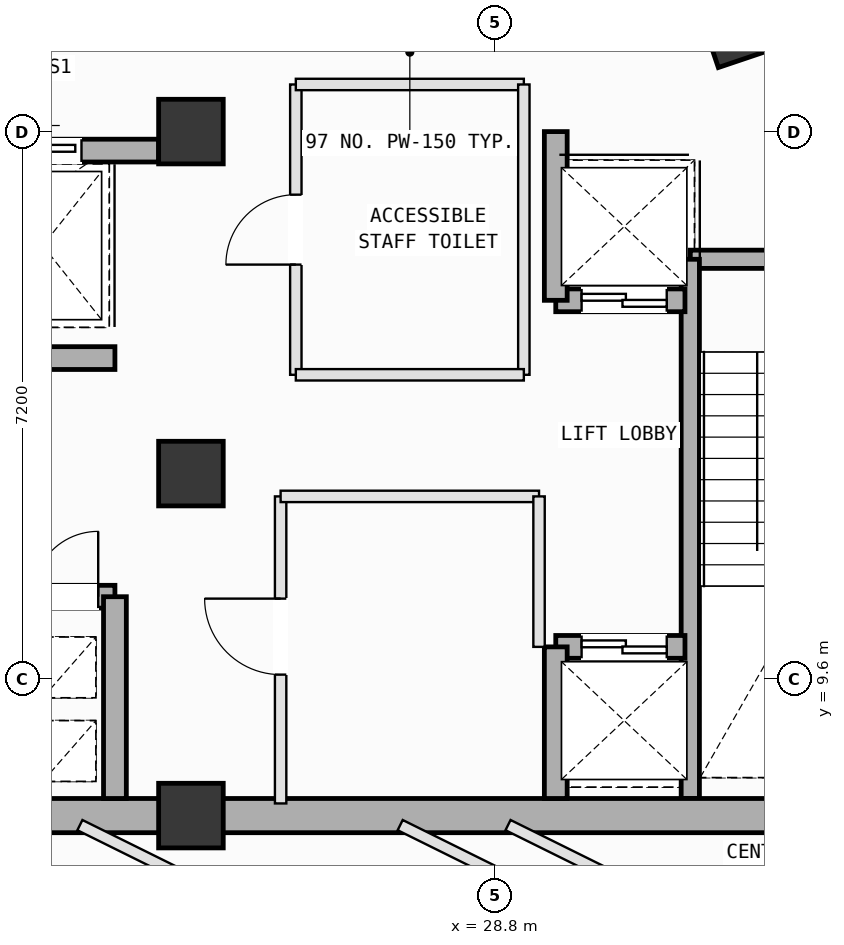
"""IFC4 building model, lengths in metres.
Left out: names, types, materials, properties, quantities, classifications, styles, units other than length and angle.
Written with IfcOpenShell. Run it as: python <this file> out.ifc"""

import sys

from ifc_helpers import new_model, si_unit, direction, frame, frame_2d, origin, origin_2d, place, context, subcontext, project, spatial, rectangle, extrude, element, fill, save


model = new_model("IFC4")
c1 = context("Model", 3, precision=1e-05, world=origin(), true_north=direction((0.0, 1.0)))
c2 = subcontext(c1, "Body", "Model", "MODEL_VIEW")
j1 = project(units=[si_unit("LENGTHUNIT", "METRE"), si_unit("PLANEANGLEUNIT", "RADIAN")], contexts=[c1])
p1 = place(None, origin())
s1 = spatial("IfcSite", under=j1, at=p1, CompositionType="ELEMENT")
p2 = place(p1, origin())
s2 = spatial("IfcBuilding", under=s1, at=p2, CompositionType="ELEMENT")
p3 = place(p2, frame((0.0, 0.0, 296.6)))
s3 = spatial("IfcBuildingStorey", under=s2, at=p3, CompositionType="ELEMENT", Elevation=296.6)
for number, where, z_axis, x_axis in (
    (1, (24.8, 7.8, 0.0), (0.0, 0.0, 1.0), (1.0, 0.0, 0.0)),
    (2, (24.8, 12.3, 0.0), (0.0, 0.0, 1.0), (1.0, 0.0, 0.0)),
    (3, (24.8, 16.8, 0.0), (0.0, 0.0, 1.0), (1.0, 0.0, 0.0)),
):
    element("IfcColumn", number, at=place(p3, frame(where, z_axis=z_axis, x_axis=x_axis)), inside=s3, PredefinedType="COLUMN", context=c2, shape_type="SweptSolid", body=[
        extrude(rectangle(XDim=0.85, YDim=0.85, at=origin_2d()), origin(), (0.0, 0.0, 1.0), 4.0),
    ])
p4 = place(p3, frame((31.37, 15.12, 0.0), z_axis=(0.0, 0.0, 1.0), x_axis=(1.0, 0.0, 0.0)))
e4 = element("IfcWall", 4, at=p4, inside=s3, PredefinedType="SOLIDWALL", context=c2, shape_type="SweptSolid", body=[
    extrude(rectangle(XDim=3.46, YDim=0.24, at=frame_2d((1.73, 0.0))), origin(), (0.0, 0.0, 1.0), 3.78),
])
p5 = place(p4, frame((2.14, 0.0, 0.0)))
e5 = element("IfcOpeningElement", 5, at=p5, cuts=e4, PredefinedType="OPENING", context=c2, shape_type="SweptSolid", body=[
    extrude(rectangle(XDim=1.1, YDim=2.15, at=frame_2d((0.55, 1.075))), frame((0.0, 0.13, 0.0), z_axis=(0.0, -1.0, 0.0), x_axis=(1.0, 0.0, 0.0)), (0.0, 0.0, 1.0), 0.26),
])
p6 = place(p3, frame((31.37, 8.025, 0.0), z_axis=(0.0, 0.0, 1.0), x_axis=(0.0, 1.0, 0.0)))
e6 = element("IfcWall", 6, at=p6, inside=s3, PredefinedType="SOLIDWALL", context=c2, shape_type="SweptSolid", body=[
    extrude(rectangle(XDim=7.095, YDim=0.24, at=frame_2d((3.548, 0.0))), origin(), (0.0, 0.0, 1.0), 3.78),
])
for number, where, z_axis, x_axis in (
    (7, (14.0, 7.8, 0.0), (0.0, 0.0, 1.0), (1.0, 0.0, 0.0)),
    (8, (24.8, 7.8, 0.0), (0.0, 0.0, 1.0), (1.0, 0.0, 0.0)),
):
    element("IfcWall", number, at=place(p3, frame(where, z_axis=z_axis, x_axis=x_axis)), inside=s3, PredefinedType="SHEAR", context=c2, shape_type="SweptSolid", body=[
        extrude(rectangle(XDim=10.8, YDim=0.45, at=frame_2d((5.4, 0.0))), origin(), (0.0, 0.0, 1.0), 3.78),
    ])
p7 = place(p3, frame((19.85, 16.55, 0.0), z_axis=(0.0, 0.0, 1.0), x_axis=(1.0, 0.0, 0.0)))
e9 = element("IfcWall", 9, at=p7, inside=s3, PredefinedType="SOLIDWALL", context=c2, shape_type="SweptSolid", body=[
    extrude(rectangle(XDim=4.525, YDim=0.3, at=frame_2d((2.262, 0.0))), origin(), (0.0, 0.0, 1.0), 3.78),
])
p8 = place(p7, frame((0.475, 0.0, 0.0)))
e10 = element("IfcOpeningElement", 10, at=p8, cuts=e9, PredefinedType="OPENING", context=c2, shape_type="SweptSolid", body=[
    extrude(rectangle(XDim=1.25, YDim=2.18, at=frame_2d((0.625, 1.09))), frame((0.0, 0.16, 0.0), z_axis=(0.0, -1.0, 0.0), x_axis=(1.0, 0.0, 0.0)), (0.0, 0.0, 1.0), 0.32),
])
p9 = place(p7, frame((2.49, 0.0, 0.0)))
e11 = element("IfcOpeningElement", 11, at=p9, cuts=e9, PredefinedType="OPENING", context=c2, shape_type="SweptSolid", body=[
    extrude(rectangle(XDim=1.02, YDim=2.12, at=frame_2d((0.51, 1.06))), frame((0.0, 0.16, 0.0), z_axis=(0.0, -1.0, 0.0), x_axis=(1.0, 0.0, 0.0)), (0.0, 0.0, 1.0), 0.32),
])
p10 = place(p3, frame((18.5, 10.68, 0.0), z_axis=(0.0, 0.0, 1.0), x_axis=(1.0, 0.0, 0.0)))
e12 = element("IfcWall", 12, at=p10, inside=s3, PredefinedType="SOLIDWALL", context=c2, shape_type="SweptSolid", body=[
    extrude(rectangle(XDim=5.3, YDim=0.3, at=frame_2d((2.65, 0.0))), origin(), (0.0, 0.0, 1.0), 3.78),
])
p11 = place(p10, frame((4.22, 0.0, 0.0)))
e13 = element("IfcOpeningElement", 13, at=p11, cuts=e12, PredefinedType="OPENING", context=c2, shape_type="SweptSolid", body=[
    extrude(rectangle(XDim=0.86, YDim=2.06, at=frame_2d((0.43, 1.03))), frame((0.0, 0.16, 0.0), z_axis=(0.0, -1.0, 0.0), x_axis=(1.0, 0.0, 0.0)), (0.0, 0.0, 1.0), 0.32),
])
p12 = place(p10, frame((0.425, 0.0, 0.0)))
e14 = element("IfcOpeningElement", 14, at=p12, cuts=e12, PredefinedType="OPENING", context=c2, shape_type="SweptSolid", body=[
    extrude(rectangle(XDim=1.25, YDim=2.18, at=frame_2d((0.625, 1.09))), frame((0.0, 0.16, 0.0), z_axis=(0.0, -1.0, 0.0), x_axis=(1.0, 0.0, 0.0)), (0.0, 0.0, 1.0), 0.32),
])
p13 = place(p10, frame((2.525, 0.0, 0.0)))
e15 = element("IfcOpeningElement", 15, at=p13, cuts=e12, PredefinedType="OPENING", context=c2, shape_type="SweptSolid", body=[
    extrude(rectangle(XDim=1.25, YDim=2.18, at=frame_2d((0.625, 1.09))), frame((0.0, 0.16, 0.0), z_axis=(0.0, -1.0, 0.0), x_axis=(1.0, 0.0, 0.0)), (0.0, 0.0, 1.0), 0.32),
])
p14 = place(p3, frame((18.5, 13.82, 0.0), z_axis=(0.0, 0.0, 1.0), x_axis=(1.0, 0.0, 0.0)))
e16 = element("IfcWall", 16, at=p14, inside=s3, PredefinedType="SOLIDWALL", context=c2, shape_type="SweptSolid", body=[
    extrude(rectangle(XDim=5.3, YDim=0.3, at=frame_2d((2.65, 0.0))), origin(), (0.0, 0.0, 1.0), 3.78),
])
p15 = place(p14, frame((0.18, 0.0, 0.0)))
e17 = element("IfcOpeningElement", 17, at=p15, cuts=e16, PredefinedType="OPENING", context=c2, shape_type="SweptSolid", body=[
    extrude(rectangle(XDim=1.1, YDim=2.15, at=frame_2d((0.55, 1.075))), frame((0.0, 0.16, 0.0), z_axis=(0.0, -1.0, 0.0), x_axis=(1.0, 0.0, 0.0)), (0.0, 0.0, 1.0), 0.32),
])
p16 = place(p3, frame((23.8, 8.025, 0.0), z_axis=(0.0, 0.0, 1.0), x_axis=(0.0, 1.0, 0.0)))
e18 = element("IfcWall", 18, at=p16, inside=s3, PredefinedType="SOLIDWALL", context=c2, shape_type="SweptSolid", body=[
    extrude(rectangle(XDim=2.655, YDim=0.3, at=frame_2d((1.328, 0.0))), origin(), (0.0, 0.0, 1.0), 3.78),
])
p17 = place(p3, frame((29.6, 10.02, 0.0), z_axis=(0.0, 0.0, 1.0), x_axis=(1.0, 0.0, 0.0)))
e19 = element("IfcWall", 19, at=p17, inside=s3, PredefinedType="SOLIDWALL", context=c2, shape_type="SweptSolid", body=[
    extrude(rectangle(XDim=1.7, YDim=0.3, at=frame_2d((0.85, 0.0))), origin(), (0.0, 0.0, 1.0), 3.78),
])
p18 = place(p17, frame((0.34, 0.0, 0.0)))
e20 = element("IfcOpeningElement", 20, at=p18, cuts=e19, PredefinedType="OPENING", context=c2, shape_type="SweptSolid", body=[
    extrude(rectangle(XDim=1.12, YDim=2.15, at=frame_2d((0.56, 1.075))), frame((0.0, 0.16, 0.0), z_axis=(0.0, -1.0, 0.0), x_axis=(1.0, 0.0, 0.0)), (0.0, 0.0, 1.0), 0.32),
])
p19 = place(p3, frame((29.6, 8.025, 0.0), z_axis=(0.0, 0.0, 1.0), x_axis=(0.0, 1.0, 0.0)))
e21 = element("IfcWall", 21, at=p19, inside=s3, PredefinedType="SOLIDWALL", context=c2, shape_type="SweptSolid", body=[
    extrude(rectangle(XDim=1.995, YDim=0.3, at=frame_2d((0.998, 0.0))), origin(), (0.0, 0.0, 1.0), 3.78),
])
p20 = place(p3, frame((29.6, 14.58, 0.0), z_axis=(0.0, 0.0, 1.0), x_axis=(1.0, 0.0, 0.0)))
e22 = element("IfcWall", 22, at=p20, inside=s3, PredefinedType="SOLIDWALL", context=c2, shape_type="SweptSolid", body=[
    extrude(rectangle(XDim=1.7, YDim=0.3, at=frame_2d((0.85, 0.0))), origin(), (0.0, 0.0, 1.0), 3.78),
])
p21 = place(p20, frame((0.34, 0.0, 0.0)))
e23 = element("IfcOpeningElement", 23, at=p21, cuts=e22, PredefinedType="OPENING", context=c2, shape_type="SweptSolid", body=[
    extrude(rectangle(XDim=1.12, YDim=2.15, at=frame_2d((0.56, 1.075))), frame((0.0, 0.16, 0.0), z_axis=(0.0, -1.0, 0.0), x_axis=(1.0, 0.0, 0.0)), (0.0, 0.0, 1.0), 0.32),
])
p22 = place(p3, frame((29.6, 14.58, 0.0), z_axis=(0.0, 0.0, 1.0), x_axis=(0.0, 1.0, 0.0)))
e24 = element("IfcWall", 24, at=p22, inside=s3, PredefinedType="SOLIDWALL", context=c2, shape_type="SweptSolid", body=[
    extrude(rectangle(XDim=2.22, YDim=0.3, at=frame_2d((1.11, 0.0))), origin(), (0.0, 0.0, 1.0), 3.78),
])
p23 = place(p3, frame((25.98, 7.96, 0.0), z_axis=(0.0, 0.0, 1.0), x_axis=(0.0, 1.0, 0.0)))
e25 = element("IfcWall", 25, at=p23, inside=s3, PredefinedType="PARTITIONING", context=c2, shape_type="SweptSolid", body=[
    extrude(rectangle(XDim=4.04, YDim=0.15, at=frame_2d((2.02, 0.0))), origin(), (0.0, 0.0, 1.0), 3.78),
])
p24 = place(p23, frame((1.695, 0.0, 0.0)))
e26 = element("IfcOpeningElement", 26, at=p24, cuts=e25, PredefinedType="OPENING", context=c2, shape_type="SweptSolid", body=[
    extrude(rectangle(XDim=1.0, YDim=2.12, at=frame_2d((0.5, 1.06))), frame((0.0, 0.085, 0.0), z_axis=(0.0, -1.0, 0.0), x_axis=(1.0, 0.0, 0.0)), (0.0, 0.0, 1.0), 0.17),
])
p25 = place(p3, frame((25.98, 12.0, 0.0), z_axis=(0.0, 0.0, 1.0), x_axis=(1.0, 0.0, 0.0)))
e27 = element("IfcWall", 27, at=p25, inside=s3, PredefinedType="PARTITIONING", context=c2, shape_type="SweptSolid", body=[
    extrude(rectangle(XDim=3.4, YDim=0.15, at=frame_2d((1.7, 0.0))), origin(), (0.0, 0.0, 1.0), 3.78),
])
p26 = place(p3, frame((29.38, 12.0, 0.0), z_axis=(0.0, 0.0, 1.0), x_axis=(0.0, -1.0, 0.0)))
e28 = element("IfcWall", 28, at=p26, inside=s3, PredefinedType="PARTITIONING", context=c2, shape_type="SweptSolid", body=[
    extrude(rectangle(XDim=1.98, YDim=0.15, at=frame_2d((0.99, 0.0))), origin(), (0.0, 0.0, 1.0), 3.78),
])
p27 = place(p3, frame((26.18, 13.6, 0.0), z_axis=(0.0, 0.0, 1.0), x_axis=(0.0, 1.0, 0.0)))
e29 = element("IfcWall", 29, at=p27, inside=s3, PredefinedType="PARTITIONING", context=c2, shape_type="SweptSolid", body=[
    extrude(rectangle(XDim=3.82, YDim=0.15, at=frame_2d((1.91, 0.0))), origin(), (0.0, 0.0, 1.0), 3.78),
])
p28 = place(p27, frame((1.45, 0.0, 0.0)))
e30 = element("IfcOpeningElement", 30, at=p28, cuts=e29, PredefinedType="OPENING", context=c2, shape_type="SweptSolid", body=[
    extrude(rectangle(XDim=0.92, YDim=2.1, at=frame_2d((0.46, 1.05))), frame((0.0, 0.085, 0.0), z_axis=(0.0, -1.0, 0.0), x_axis=(1.0, 0.0, 0.0)), (0.0, 0.0, 1.0), 0.17),
])
p29 = place(p3, frame((26.18, 17.42, 0.0), z_axis=(0.0, 0.0, 1.0), x_axis=(1.0, 0.0, 0.0)))
e31 = element("IfcWall", 31, at=p29, inside=s3, PredefinedType="PARTITIONING", context=c2, shape_type="SweptSolid", body=[
    extrude(rectangle(XDim=3.0, YDim=0.15, at=frame_2d((1.5, 0.0))), origin(), (0.0, 0.0, 1.0), 3.78),
])
p30 = place(p3, frame((29.18, 17.42, 0.0), z_axis=(0.0, 0.0, 1.0), x_axis=(0.0, -1.0, 0.0)))
e32 = element("IfcWall", 32, at=p30, inside=s3, PredefinedType="PARTITIONING", context=c2, shape_type="SweptSolid", body=[
    extrude(rectangle(XDim=3.82, YDim=0.15, at=frame_2d((1.91, 0.0))), origin(), (0.0, 0.0, 1.0), 3.78),
])
p31 = place(p3, frame((29.18, 13.6, 0.0), z_axis=(0.0, 0.0, 1.0), x_axis=(-1.0, 0.0, 0.0)))
e33 = element("IfcWall", 33, at=p31, inside=s3, PredefinedType="PARTITIONING", context=c2, shape_type="SweptSolid", body=[
    extrude(rectangle(XDim=3.0, YDim=0.15, at=frame_2d((1.5, 0.0))), origin(), (0.0, 0.0, 1.0), 3.78),
])
p32 = place(p3, frame((23.339, 7.675, 0.0), z_axis=(0.0, 0.0, 1.0), x_axis=(0.896093187534, -0.443865969923, 0.0)))
e34 = element("IfcWall", 34, at=p32, inside=s3, PredefinedType="PARTITIONING", context=c2, shape_type="SweptSolid", body=[
    extrude(rectangle(XDim=4.409, YDim=0.15, at=frame_2d((2.205, 0.0))), origin(), (0.0, 0.0, 1.0), 3.78),
])
p33 = place(p3, frame((35.107, 4.636, 0.0), z_axis=(0.0, 0.0, 1.0), x_axis=(-0.8960827402, 0.443887060767, 0.0)))
e35 = element("IfcWall", 35, at=p33, inside=s3, PredefinedType="PARTITIONING", context=c2, shape_type="SweptSolid", body=[
    extrude(rectangle(XDim=6.846, YDim=0.15, at=frame_2d((3.423, 0.0))), origin(), (0.0, 0.0, 1.0), 3.78),
])
p34 = place(p3, frame((27.553, 7.675, 0.0), z_axis=(0.0, 0.0, 1.0), x_axis=(0.896074338839, -0.443904020341, 0.0)))
e36 = element("IfcWall", 36, at=p34, inside=s3, PredefinedType="PARTITIONING", context=c2, shape_type="SweptSolid", body=[
    extrude(rectangle(XDim=6.409, YDim=0.15, at=frame_2d((3.205, 0.0))), origin(), (0.0, 0.0, 1.0), 3.78),
])
p35 = place(p11, origin())
e37 = element("IfcDoor", 37, at=p35, inside=s3, OperationType="SINGLE_SWING_RIGHT", PredefinedType="DOOR", context=c2, shape_type="SweptSolid", body=[
    extrude(rectangle(XDim=0.86, YDim=2.06, at=frame_2d((0.43, 1.03))), frame((0.0, 0.025, 0.0), z_axis=(0.0, -1.0, 0.0), x_axis=(1.0, 0.0, 0.0)), (0.0, 0.0, 1.0), 0.05),
])
fill(e13, e37)
p36 = place(p18, origin())
e38 = element("IfcDoor", 38, at=p36, inside=s3, OperationType="DOUBLE_DOOR_SLIDING", PredefinedType="DOOR", context=c2, shape_type="SweptSolid", body=[
    extrude(rectangle(XDim=1.12, YDim=2.15, at=frame_2d((0.56, 1.075))), frame((0.0, 0.025, 0.0), z_axis=(0.0, -1.0, 0.0), x_axis=(1.0, 0.0, 0.0)), (0.0, 0.0, 1.0), 0.05),
])
fill(e20, e38)
p37 = place(p21, origin())
e39 = element("IfcDoor", 39, at=p37, inside=s3, OperationType="DOUBLE_DOOR_SLIDING", PredefinedType="DOOR", context=c2, shape_type="SweptSolid", body=[
    extrude(rectangle(XDim=1.12, YDim=2.15, at=frame_2d((0.56, 1.075))), frame((0.0, 0.025, 0.0), z_axis=(0.0, -1.0, 0.0), x_axis=(1.0, 0.0, 0.0)), (0.0, 0.0, 1.0), 0.05),
])
fill(e23, e39)
p38 = place(p9, origin())
e40 = element("IfcDoor", 40, at=p38, inside=s3, OperationType="SLIDING_TO_LEFT", PredefinedType="DOOR", context=c2, shape_type="SweptSolid", body=[
    extrude(rectangle(XDim=1.02, YDim=2.12, at=frame_2d((0.51, 1.06))), frame((0.0, 0.025, 0.0), z_axis=(0.0, -1.0, 0.0), x_axis=(1.0, 0.0, 0.0)), (0.0, 0.0, 1.0), 0.05),
])
fill(e11, e40)
p39 = place(p24, origin())
e41 = element("IfcDoor", 41, at=p39, inside=s3, OperationType="SINGLE_SWING_RIGHT", PredefinedType="DOOR", context=c2, shape_type="SweptSolid", body=[
    extrude(rectangle(XDim=1.0, YDim=2.12, at=frame_2d((0.5, 1.06))), frame((0.0, 0.025, 0.0), z_axis=(0.0, -1.0, 0.0), x_axis=(1.0, 0.0, 0.0)), (0.0, 0.0, 1.0), 0.05),
])
fill(e26, e41)
p40 = place(p28, origin())
e42 = element("IfcDoor", 42, at=p40, inside=s3, OperationType="SINGLE_SWING_LEFT", PredefinedType="DOOR", context=c2, shape_type="SweptSolid", body=[
    extrude(rectangle(XDim=0.92, YDim=2.1, at=frame_2d((0.46, 1.05))), frame((0.0, 0.025, 0.0), z_axis=(0.0, -1.0, 0.0), x_axis=(1.0, 0.0, 0.0)), (0.0, 0.0, 1.0), 0.05),
])
fill(e30, e42)
save(model, sys.argv[1])
